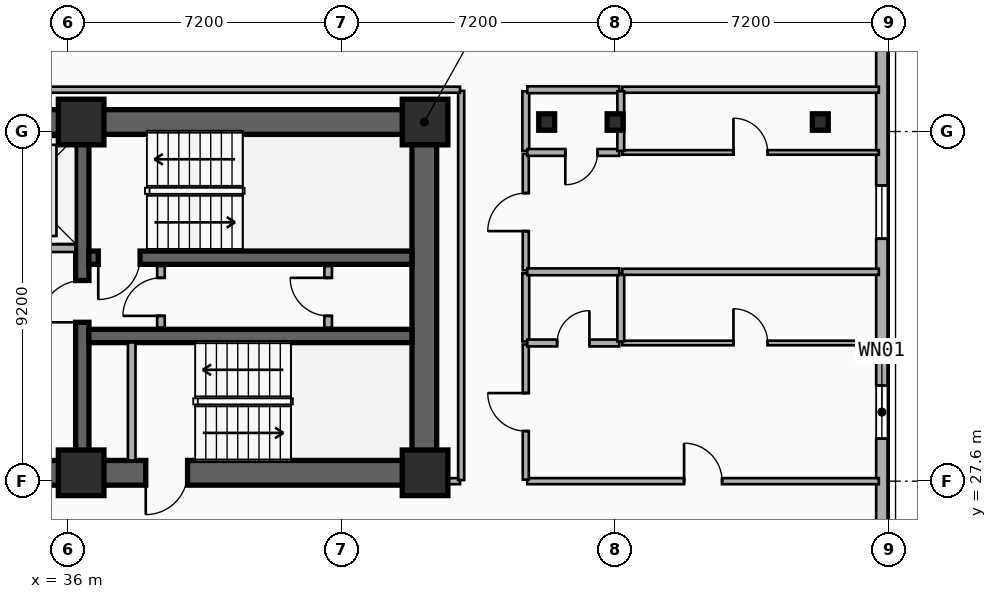
"""IFC4 building model, lengths in metres.
Left out: names, types, materials, properties, quantities, classifications, styles, units other than length and angle.
Written with IfcOpenShell. Run it as: python <this file> out.ifc"""

import sys

from ifc_helpers import new_model, si_unit, direction, frame, frame_2d, origin, origin_2d, place, context, subcontext, project, spatial, rectangle, i_section, extrude, element, fill, save


model = new_model("IFC4")
c1 = context("Model", 3, precision=1e-05, world=origin(), true_north=direction((0.0, 1.0)))
c2 = subcontext(c1, "Body", "Model", "MODEL_VIEW")
j1 = project(units=[si_unit("LENGTHUNIT", "METRE"), si_unit("PLANEANGLEUNIT", "RADIAN")], contexts=[c1])
p1 = place(None, origin())
s1 = spatial("IfcSite", under=j1, at=p1, CompositionType="ELEMENT")
p2 = place(p1, origin())
s2 = spatial("IfcBuilding", under=s1, at=p2, CompositionType="ELEMENT")
p3 = place(p2, frame((0.0, 0.0, 125.8)))
s3 = spatial("IfcBuildingStorey", under=s2, at=p3, CompositionType="ELEMENT", Elevation=125.8)
p4 = place(p3, frame((12.15, 37.05, 0.0), z_axis=(0.0, 0.0, 1.0), x_axis=(1.0, 0.0, 0.0)))
e1 = element("IfcWall", 1, at=p4, inside=s3, PredefinedType="SHEAR", context=c2, shape_type="SweptSolid", body=[
    extrude(rectangle(XDim=33.23, YDim=0.65, at=frame_2d((16.615, 0.0))), origin(), (0.0, 0.0, 1.0), 3.5),
])
p5 = place(p3, frame((45.38, 27.82, 0.0), z_axis=(0.0, 0.0, 1.0), x_axis=(-1.0, 0.0, 0.0)))
e2 = element("IfcWall", 2, at=p5, inside=s3, PredefinedType="SHEAR", context=c2, shape_type="SweptSolid", body=[
    extrude(rectangle(XDim=12.23, YDim=0.65, at=frame_2d((6.115, 0.0))), origin(), (0.0, 0.0, 1.0), 3.5),
])
p6 = place(p5, frame((9.93, 0.0, 0.0)))
e3 = element("IfcOpeningElement", 3, at=p6, cuts=e2, PredefinedType="OPENING", context=c2, shape_type="SweptSolid", body=[
    extrude(rectangle(XDim=1.1, YDim=2.15, at=frame_2d((0.55, 1.075))), frame((0.0, 0.335, 0.0), z_axis=(0.0, -1.0, 0.0), x_axis=(1.0, 0.0, 0.0)), (0.0, 0.0, 1.0), 0.67),
])
p7 = place(p5, frame((6.23, 0.0, 0.0)))
e4 = element("IfcOpeningElement", 4, at=p7, cuts=e2, PredefinedType="OPENING", context=c2, shape_type="SweptSolid", body=[
    extrude(rectangle(XDim=1.1, YDim=2.15, at=frame_2d((0.55, 1.075))), frame((0.0, 0.335, 0.0), z_axis=(0.0, -1.0, 0.0), x_axis=(1.0, 0.0, 0.0)), (0.0, 0.0, 1.0), 0.67),
])
p8 = place(p3, frame((45.38, 28.145, 0.0), z_axis=(0.0, 0.0, 1.0), x_axis=(0.0, 1.0, 0.0)))
e5 = element("IfcWall", 5, at=p8, inside=s3, PredefinedType="SHEAR", context=c2, shape_type="SweptSolid", body=[
    extrude(rectangle(XDim=8.58, YDim=0.65, at=frame_2d((4.29, 0.0))), origin(), (0.0, 0.0, 1.0), 3.5),
])
p9 = place(p3, frame((36.38, 28.145, 0.0), z_axis=(0.0, 0.0, 1.0), x_axis=(0.0, 1.0, 0.0)))
e6 = element("IfcWall", 6, at=p9, inside=s3, PredefinedType="SHEAR", context=c2, shape_type="SweptSolid", body=[
    extrude(rectangle(XDim=8.58, YDim=0.35, at=frame_2d((4.29, 0.0))), origin(), (0.0, 0.0, 1.0), 3.5),
])
p10 = place(p9, frame((3.635, 0.0, 0.0)))
e7 = element("IfcOpeningElement", 7, at=p10, cuts=e6, PredefinedType="OPENING", context=c2, shape_type="SweptSolid", body=[
    extrude(rectangle(XDim=1.1, YDim=2.15, at=frame_2d((0.55, 1.075))), frame((0.0, 0.185, 0.0), z_axis=(0.0, -1.0, 0.0), x_axis=(1.0, 0.0, 0.0)), (0.0, 0.0, 1.0), 0.37),
])
p11 = place(p3, frame((45.055, 33.48, 0.0), z_axis=(0.0, 0.0, 1.0), x_axis=(-1.0, 0.0, 0.0)))
e8 = element("IfcWall", 8, at=p11, inside=s3, PredefinedType="SHEAR", context=c2, shape_type="SweptSolid", body=[
    extrude(rectangle(XDim=8.5, YDim=0.35, at=frame_2d((4.25, 0.0))), origin(), (0.0, 0.0, 1.0), 3.5),
])
p12 = place(p11, frame((7.155, 0.0, 0.0)))
e9 = element("IfcOpeningElement", 9, at=p12, cuts=e8, PredefinedType="OPENING", context=c2, shape_type="SweptSolid", body=[
    extrude(rectangle(XDim=1.1, YDim=2.15, at=frame_2d((0.55, 1.075))), frame((0.0, 0.185, 0.0), z_axis=(0.0, -1.0, 0.0), x_axis=(1.0, 0.0, 0.0)), (0.0, 0.0, 1.0), 0.37),
])
p13 = place(p3, frame((36.555, 31.42, 0.0), z_axis=(0.0, 0.0, 1.0), x_axis=(1.0, 0.0, 0.0)))
e10 = element("IfcWall", 10, at=p13, inside=s3, PredefinedType="SHEAR", context=c2, shape_type="SweptSolid", body=[
    extrude(rectangle(XDim=8.5, YDim=0.35, at=frame_2d((4.25, 0.0))), origin(), (0.0, 0.0, 1.0), 3.5),
])
for number, where, z_axis, x_axis in (
    (11, (36.35, 27.82, 0.0), (0.0, 0.0, 1.0), (1.0, 0.0, 0.0)),
    (12, (36.35, 37.05, 0.0), (0.0, 0.0, 1.0), (1.0, 0.0, 0.0)),
    (13, (45.4, 27.82, 0.0), (0.0, 0.0, 1.0), (1.0, 0.0, 0.0)),
    (14, (45.4, 37.05, 0.0), (0.0, 0.0, 1.0), (1.0, 0.0, 0.0)),
):
    element("IfcColumn", number, at=place(p3, frame(where, z_axis=z_axis, x_axis=x_axis)), inside=s3, PredefinedType="COLUMN", context=c2, shape_type="SweptSolid", body=[
        extrude(rectangle(XDim=1.2, YDim=1.2, at=origin_2d()), origin(), (0.0, 0.0, 1.0), 3.5),
    ])
for number, where, z_axis, x_axis in (
    (15, (48.6, 37.05, 0.0), (0.0, 0.0, 1.0), (1.0, 0.0, 0.0)),
    (16, (50.4, 37.05, 0.0), (0.0, 0.0, 1.0), (1.0, 0.0, 0.0)),
    (17, (55.8, 37.05, 0.0), (0.0, 0.0, 1.0), (1.0, 0.0, 0.0)),
):
    element("IfcColumn", number, at=place(p3, frame(where, z_axis=z_axis, x_axis=x_axis)), inside=s3, PredefinedType="COLUMN", context=c2, shape_type="SweptSolid", body=[
        extrude(i_section(OverallWidth=0.418, OverallDepth=0.432, WebThickness=0.035, FlangeThickness=0.056, FilletRadius=0.015, at=origin_2d()), origin(), (0.0, 0.0, 1.0), 3.5),
    ])
p14 = place(p3, frame((57.42, 39.0, 0.0), z_axis=(0.0, 0.0, 1.0), x_axis=(0.0, -1.0, 0.0)))
e18 = element("IfcWall", 18, at=p14, inside=s3, PredefinedType="SOLIDWALL", context=c2, shape_type="SweptSolid", body=[
    extrude(rectangle(XDim=18.0, YDim=0.3, at=frame_2d((9.0, 0.0))), origin(), (0.0, 0.0, 1.0), 3.24),
])
p15 = place(p14, frame((8.882, 0.0, 0.48)))
e19 = element("IfcOpeningElement", 19, at=p15, cuts=e18, PredefinedType="OPENING", context=c2, shape_type="SweptSolid", body=[
    extrude(rectangle(XDim=1.4, YDim=1.8, at=frame_2d((0.7, 0.9))), frame((0.0, 0.16, 0.0), z_axis=(0.0, -1.0, 0.0), x_axis=(1.0, 0.0, 0.0)), (0.0, 0.0, 1.0), 0.32),
])
p16 = place(p14, frame((3.621, 0.0, 0.48)))
e20 = element("IfcOpeningElement", 20, at=p16, cuts=e18, PredefinedType="OPENING", context=c2, shape_type="SweptSolid", body=[
    extrude(rectangle(XDim=1.4, YDim=1.8, at=frame_2d((0.7, 0.9))), frame((0.0, 0.16, 0.0), z_axis=(0.0, -1.0, 0.0), x_axis=(1.0, 0.0, 0.0)), (0.0, 0.0, 1.0), 0.32),
])
p17 = place(p14, frame((14.625, 0.0, 0.48)))
e21 = element("IfcOpeningElement", 21, at=p17, cuts=e18, PredefinedType="OPENING", context=c2, shape_type="SweptSolid", body=[
    extrude(rectangle(XDim=1.4, YDim=1.8, at=frame_2d((0.7, 0.9))), frame((0.0, 0.16, 0.0), z_axis=(0.0, -1.0, 0.0), x_axis=(1.0, 0.0, 0.0)), (0.0, 0.0, 1.0), 0.32),
])
p18 = place(p3, frame((33.475, 33.73, 0.0), z_axis=(0.0, 0.0, 1.0), x_axis=(1.0, 0.0, 0.0)))
e22 = element("IfcWall", 22, at=p18, inside=s3, PredefinedType="PARTITIONING", context=c2, shape_type="SweptSolid", body=[
    extrude(rectangle(XDim=2.725, YDim=0.2, at=frame_2d((1.362, 0.0))), origin(), (0.0, 0.0, 1.0), 2.212),
])
p19 = place(p18, frame((0.812, 0.0, 0.0)))
e23 = element("IfcOpeningElement", 23, at=p19, cuts=e22, PredefinedType="OPENING", context=c2, shape_type="SweptSolid", body=[
    extrude(rectangle(XDim=1.1, YDim=2.15, at=frame_2d((0.55, 1.075))), frame((0.0, 0.11, 0.0), z_axis=(0.0, -1.0, 0.0), x_axis=(1.0, 0.0, 0.0)), (0.0, 0.0, 1.0), 0.22),
])
p20 = place(p3, frame((37.68, 28.145, 0.0), z_axis=(0.0, 0.0, 1.0), x_axis=(0.0, 1.0, 0.0)))
e24 = element("IfcWall", 24, at=p20, inside=s3, PredefinedType="PARTITIONING", context=c2, shape_type="SweptSolid", body=[
    extrude(rectangle(XDim=3.105, YDim=0.2, at=frame_2d((1.552, 0.0))), origin(), (0.0, 0.0, 1.0), 2.62),
])
p21 = place(p3, frame((38.45, 31.64, 0.0), z_axis=(0.0, 0.0, 1.0), x_axis=(0.0, 1.0, 0.0)))
e25 = element("IfcWall", 25, at=p21, inside=s3, PredefinedType="PARTITIONING", context=c2, shape_type="SweptSolid", body=[
    extrude(rectangle(XDim=1.62, YDim=0.2, at=frame_2d((0.81, 0.0))), origin(), (0.0, 0.0, 1.0), 3.24),
])
p22 = place(p21, frame((0.31, 0.0, 0.0)))
e26 = element("IfcOpeningElement", 26, at=p22, cuts=e25, PredefinedType="OPENING", context=c2, shape_type="SweptSolid", body=[
    extrude(rectangle(XDim=1.0, YDim=2.15, at=frame_2d((0.5, 1.075))), frame((0.0, 0.11, 0.0), z_axis=(0.0, -1.0, 0.0), x_axis=(1.0, 0.0, 0.0)), (0.0, 0.0, 1.0), 0.22),
])
p23 = place(p3, frame((42.85, 31.64, 0.0), z_axis=(0.0, 0.0, 1.0), x_axis=(0.0, 1.0, 0.0)))
e27 = element("IfcWall", 27, at=p23, inside=s3, PredefinedType="PARTITIONING", context=c2, shape_type="SweptSolid", body=[
    extrude(rectangle(XDim=1.62, YDim=0.2, at=frame_2d((0.81, 0.0))), origin(), (0.0, 0.0, 1.0), 3.24),
])
p24 = place(p23, frame((0.31, 0.0, 0.0)))
e28 = element("IfcOpeningElement", 28, at=p24, cuts=e27, PredefinedType="OPENING", context=c2, shape_type="SweptSolid", body=[
    extrude(rectangle(XDim=1.0, YDim=2.15, at=frame_2d((0.5, 1.075))), frame((0.0, 0.11, 0.0), z_axis=(0.0, -1.0, 0.0), x_axis=(1.0, 0.0, 0.0)), (0.0, 0.0, 1.0), 0.22),
])
p25 = place(p3, frame((48.09, 27.6, 0.0), z_axis=(0.0, 0.0, 1.0), x_axis=(1.0, 0.0, 0.0)))
e29 = element("IfcWall", 29, at=p25, inside=s3, PredefinedType="PARTITIONING", context=c2, shape_type="SweptSolid", body=[
    extrude(rectangle(XDim=9.25, YDim=0.16, at=frame_2d((4.625, 0.0))), origin(), (0.0, 0.0, 1.0), 2.57),
])
p26 = place(p25, frame((4.125, 0.0, 0.0)))
e30 = element("IfcOpeningElement", 30, at=p26, cuts=e29, PredefinedType="OPENING", context=c2, shape_type="SweptSolid", body=[
    extrude(rectangle(XDim=1.0, YDim=2.15, at=frame_2d((0.5, 1.075))), frame((0.0, 0.09, 0.0), z_axis=(0.0, -1.0, 0.0), x_axis=(1.0, 0.0, 0.0)), (0.0, 0.0, 1.0), 0.18),
])
p27 = place(p3, frame((48.05, 27.64, 0.0), z_axis=(0.0, 0.0, 1.0), x_axis=(0.0, 1.0, 0.0)))
e31 = element("IfcWall", 31, at=p27, inside=s3, PredefinedType="PARTITIONING", context=c2, shape_type="SweptSolid", body=[
    extrude(rectangle(XDim=3.556, YDim=0.16, at=frame_2d((1.778, 0.0))), origin(), (0.0, 0.0, 1.0), 3.24),
])
p28 = place(p27, frame((1.278, 0.0, 0.0)))
e32 = element("IfcOpeningElement", 32, at=p28, cuts=e31, PredefinedType="OPENING", context=c2, shape_type="SweptSolid", body=[
    extrude(rectangle(XDim=1.0, YDim=2.15, at=frame_2d((0.5, 1.075))), frame((0.0, 0.09, 0.0), z_axis=(0.0, -1.0, 0.0), x_axis=(1.0, 0.0, 0.0)), (0.0, 0.0, 1.0), 0.18),
])
p29 = place(p3, frame((48.05, 31.276, 0.0), z_axis=(0.0, 0.0, 1.0), x_axis=(0.0, 1.0, 0.0)))
e33 = element("IfcWall", 33, at=p29, inside=s3, PredefinedType="PLUMBINGWALL", context=c2, shape_type="SweptSolid", body=[
    extrude(rectangle(XDim=1.793, YDim=0.18, at=frame_2d((0.896, 0.0))), origin(), (0.0, 0.0, 1.0), 3.24),
])
p30 = place(p3, frame((48.05, 33.149, 0.0), z_axis=(0.0, 0.0, 1.0), x_axis=(0.0, 1.0, 0.0)))
e34 = element("IfcWall", 34, at=p30, inside=s3, PredefinedType="PARTITIONING", context=c2, shape_type="SweptSolid", body=[
    extrude(rectangle(XDim=3.061, YDim=0.16, at=frame_2d((1.531, 0.0))), origin(), (0.0, 0.0, 1.0), 3.24),
])
p31 = place(p30, frame((1.031, 0.0, 0.0)))
e35 = element("IfcOpeningElement", 35, at=p31, cuts=e34, PredefinedType="OPENING", context=c2, shape_type="SweptSolid", body=[
    extrude(rectangle(XDim=1.0, YDim=2.15, at=frame_2d((0.5, 1.075))), frame((0.0, 0.09, 0.0), z_axis=(0.0, -1.0, 0.0), x_axis=(1.0, 0.0, 0.0)), (0.0, 0.0, 1.0), 0.18),
])
p32 = place(p3, frame((48.05, 36.29, 0.0), z_axis=(0.0, 0.0, 1.0), x_axis=(0.0, 1.0, 0.0)))
e36 = element("IfcWall", 36, at=p32, inside=s3, PredefinedType="PLUMBINGWALL", context=c2, shape_type="SweptSolid", body=[
    extrude(rectangle(XDim=1.57, YDim=0.18, at=frame_2d((0.785, 0.0))), origin(), (0.0, 0.0, 1.0), 2.72),
])
p33 = place(p3, frame((48.09, 37.9, 0.0), z_axis=(0.0, 0.0, 1.0), x_axis=(1.0, 0.0, 0.0)))
e37 = element("IfcWall", 37, at=p33, inside=s3, PredefinedType="PLUMBINGWALL", context=c2, shape_type="SweptSolid", body=[
    extrude(rectangle(XDim=2.42, YDim=0.18, at=frame_2d((1.21, 0.0))), origin(), (0.0, 0.0, 1.0), 3.24),
])
p34 = place(p3, frame((50.59, 37.9, 0.0), z_axis=(0.0, 0.0, 1.0), x_axis=(1.0, 0.0, 0.0)))
e38 = element("IfcWall", 38, at=p34, inside=s3, PredefinedType="PARTITIONING", context=c2, shape_type="SweptSolid", body=[
    extrude(rectangle(XDim=6.75, YDim=0.16, at=frame_2d((3.375, 0.0))), origin(), (0.0, 0.0, 1.0), 3.24),
])
p35 = place(p3, frame((48.09, 31.236, 0.0), z_axis=(0.0, 0.0, 1.0), x_axis=(1.0, 0.0, 0.0)))
e39 = element("IfcWall", 39, at=p35, inside=s3, PredefinedType="PLUMBINGWALL", context=c2, shape_type="SweptSolid", body=[
    extrude(rectangle(XDim=2.42, YDim=0.18, at=frame_2d((1.21, 0.0))), origin(), (0.0, 0.0, 1.0), 2.57),
])
p36 = place(p35, frame((0.785, 0.0, 0.0)))
e40 = element("IfcOpeningElement", 40, at=p36, cuts=e39, PredefinedType="OPENING", context=c2, shape_type="SweptSolid", body=[
    extrude(rectangle(XDim=0.85, YDim=2.1, at=frame_2d((0.425, 1.05))), frame((0.0, 0.1, 0.0), z_axis=(0.0, -1.0, 0.0), x_axis=(1.0, 0.0, 0.0)), (0.0, 0.0, 1.0), 0.2),
])
p37 = place(p3, frame((50.59, 31.236, 0.0), z_axis=(0.0, 0.0, 1.0), x_axis=(1.0, 0.0, 0.0)))
e41 = element("IfcWall", 41, at=p37, inside=s3, PredefinedType="PARTITIONING", context=c2, shape_type="SweptSolid", body=[
    extrude(rectangle(XDim=6.75, YDim=0.12, at=frame_2d((3.375, 0.0))), origin(), (0.0, 0.0, 1.0), 2.57),
])
p38 = place(p37, frame((2.925, 0.0, 0.0)))
e42 = element("IfcOpeningElement", 42, at=p38, cuts=e41, PredefinedType="OPENING", context=c2, shape_type="SweptSolid", body=[
    extrude(rectangle(XDim=0.9, YDim=2.1, at=frame_2d((0.45, 1.05))), frame((0.0, 0.07, 0.0), z_axis=(0.0, -1.0, 0.0), x_axis=(1.0, 0.0, 0.0)), (0.0, 0.0, 1.0), 0.14),
])
p39 = place(p3, frame((50.55, 31.276, 0.0), z_axis=(0.0, 0.0, 1.0), x_axis=(0.0, 1.0, 0.0)))
e43 = element("IfcWall", 43, at=p39, inside=s3, PredefinedType="PLUMBINGWALL", context=c2, shape_type="SweptSolid", body=[
    extrude(rectangle(XDim=1.793, YDim=0.18, at=frame_2d((0.896, 0.0))), origin(), (0.0, 0.0, 1.0), 2.57),
])
p40 = place(p3, frame((48.09, 33.109, 0.0), z_axis=(0.0, 0.0, 1.0), x_axis=(1.0, 0.0, 0.0)))
e44 = element("IfcWall", 44, at=p40, inside=s3, PredefinedType="PLUMBINGWALL", context=c2, shape_type="SweptSolid", body=[
    extrude(rectangle(XDim=2.42, YDim=0.18, at=frame_2d((1.21, 0.0))), origin(), (0.0, 0.0, 1.0), 2.57),
])
p41 = place(p3, frame((50.59, 33.109, 0.0), z_axis=(0.0, 0.0, 1.0), x_axis=(1.0, 0.0, 0.0)))
e45 = element("IfcWall", 45, at=p41, inside=s3, PredefinedType="PARTITIONING", context=c2, shape_type="SweptSolid", body=[
    extrude(rectangle(XDim=6.75, YDim=0.16, at=frame_2d((3.375, 0.0))), origin(), (0.0, 0.0, 1.0), 2.57),
])
p42 = place(p3, frame((50.51, 36.25, 0.0), z_axis=(0.0, 0.0, 1.0), x_axis=(-1.0, 0.0, 0.0)))
e46 = element("IfcWall", 46, at=p42, inside=s3, PredefinedType="PLUMBINGWALL", context=c2, shape_type="SweptSolid", body=[
    extrude(rectangle(XDim=2.42, YDim=0.18, at=frame_2d((1.21, 0.0))), origin(), (0.0, 0.0, 1.0), 2.57),
])
p43 = place(p42, frame((0.57, 0.0, 0.0)))
e47 = element("IfcOpeningElement", 47, at=p43, cuts=e46, PredefinedType="OPENING", context=c2, shape_type="SweptSolid", body=[
    extrude(rectangle(XDim=0.85, YDim=2.1, at=frame_2d((0.425, 1.05))), frame((0.0, 0.1, 0.0), z_axis=(0.0, -1.0, 0.0), x_axis=(1.0, 0.0, 0.0)), (0.0, 0.0, 1.0), 0.2),
])
p44 = place(p3, frame((50.59, 36.25, 0.0), z_axis=(0.0, 0.0, 1.0), x_axis=(1.0, 0.0, 0.0)))
e48 = element("IfcWall", 48, at=p44, inside=s3, PredefinedType="PARTITIONING", context=c2, shape_type="SweptSolid", body=[
    extrude(rectangle(XDim=6.75, YDim=0.12, at=frame_2d((3.375, 0.0))), origin(), (0.0, 0.0, 1.0), 2.57),
])
p45 = place(p44, frame((2.925, 0.0, 0.0)))
e49 = element("IfcOpeningElement", 49, at=p45, cuts=e48, PredefinedType="OPENING", context=c2, shape_type="SweptSolid", body=[
    extrude(rectangle(XDim=0.9, YDim=2.1, at=frame_2d((0.45, 1.05))), frame((0.0, 0.07, 0.0), z_axis=(0.0, -1.0, 0.0), x_axis=(1.0, 0.0, 0.0)), (0.0, 0.0, 1.0), 0.14),
])
p46 = place(p3, frame((50.55, 36.29, 0.0), z_axis=(0.0, 0.0, 1.0), x_axis=(0.0, 1.0, 0.0)))
e50 = element("IfcWall", 50, at=p46, inside=s3, PredefinedType="PLUMBINGWALL", context=c2, shape_type="SweptSolid", body=[
    extrude(rectangle(XDim=1.57, YDim=0.18, at=frame_2d((0.785, 0.0))), origin(), (0.0, 0.0, 1.0), 2.57),
])
p47 = place(p3, frame((45.41, 27.6, 0.0), z_axis=(0.0, 0.0, 1.0), x_axis=(1.0, 0.0, 0.0)))
e51 = element("IfcWall", 51, at=p47, inside=s3, PredefinedType="PARTITIONING", context=c2, shape_type="SweptSolid", body=[
    extrude(rectangle(XDim=0.91, YDim=0.16, at=frame_2d((0.455, 0.0))), origin(), (0.0, 0.0, 1.0), 2.28),
])
p48 = place(p3, frame((46.35, 27.63, 0.0), z_axis=(0.0, 0.0, 1.0), x_axis=(0.0, 1.0, 0.0)))
e52 = element("IfcWall", 52, at=p48, inside=s3, PredefinedType="PARTITIONING", context=c2, shape_type="SweptSolid", body=[
    extrude(rectangle(XDim=10.24, YDim=0.16, at=frame_2d((5.12, 0.0))), origin(), (0.0, 0.0, 1.0), 2.72),
])
p49 = place(p3, frame((11.28, 37.9, 0.0), z_axis=(0.0, 0.0, 1.0), x_axis=(1.0, 0.0, 0.0)))
e53 = element("IfcWall", 53, at=p49, inside=s3, PredefinedType="PARTITIONING", context=c2, shape_type="SweptSolid", body=[
    extrude(rectangle(XDim=35.04, YDim=0.16, at=frame_2d((17.52, 0.0))), origin(), (0.0, 0.0, 1.0), 3.24),
])
p50 = place(p15, origin())
e54 = element("IfcWindow", 54, at=p50, inside=s3, PartitioningType="SINGLE_PANEL", PredefinedType="WINDOW", context=c2, shape_type="SweptSolid", body=[
    extrude(rectangle(XDim=1.4, YDim=1.8, at=frame_2d((0.7, 0.9))), frame((0.0, 0.03, 0.0), z_axis=(0.0, -1.0, 0.0), x_axis=(1.0, 0.0, 0.0)), (0.0, 0.0, 1.0), 0.06),
])
fill(e19, e54)
p51 = place(p16, origin())
e55 = element("IfcWindow", 55, at=p51, inside=s3, PartitioningType="SINGLE_PANEL", PredefinedType="WINDOW", context=c2, shape_type="SweptSolid", body=[
    extrude(rectangle(XDim=1.4, YDim=1.8, at=frame_2d((0.7, 0.9))), frame((0.0, 0.03, 0.0), z_axis=(0.0, -1.0, 0.0), x_axis=(1.0, 0.0, 0.0)), (0.0, 0.0, 1.0), 0.06),
])
fill(e20, e55)
p52 = place(p12, origin())
e56 = element("IfcDoor", 56, at=p52, inside=s3, OperationType="SINGLE_SWING_RIGHT", PredefinedType="DOOR", context=c2, shape_type="SweptSolid", body=[
    extrude(rectangle(XDim=1.1, YDim=2.15, at=frame_2d((0.55, 1.075))), frame((0.0, 0.025, 0.0), z_axis=(0.0, -1.0, 0.0), x_axis=(1.0, 0.0, 0.0)), (0.0, 0.0, 1.0), 0.05),
])
fill(e9, e56)
p53 = place(p10, origin())
e57 = element("IfcDoor", 57, at=p53, inside=s3, OperationType="SINGLE_SWING_LEFT", PredefinedType="DOOR", context=c2, shape_type="SweptSolid", body=[
    extrude(rectangle(XDim=1.1, YDim=2.15, at=frame_2d((0.55, 1.075))), frame((0.0, 0.025, 0.0), z_axis=(0.0, -1.0, 0.0), x_axis=(1.0, 0.0, 0.0)), (0.0, 0.0, 1.0), 0.05),
])
fill(e7, e57)
p54 = place(p7, origin())
e58 = element("IfcDoor", 58, at=p54, inside=s3, OperationType="SINGLE_SWING_RIGHT", PredefinedType="DOOR", context=c2, shape_type="SweptSolid", body=[
    extrude(rectangle(XDim=1.1, YDim=2.15, at=frame_2d((0.55, 1.075))), frame((0.0, 0.025, 0.0), z_axis=(0.0, -1.0, 0.0), x_axis=(1.0, 0.0, 0.0)), (0.0, 0.0, 1.0), 0.05),
])
fill(e4, e58)
p55 = place(p22, origin())
e59 = element("IfcDoor", 59, at=p55, inside=s3, OperationType="SINGLE_SWING_LEFT", PredefinedType="DOOR", context=c2, shape_type="SweptSolid", body=[
    extrude(rectangle(XDim=1.0, YDim=2.15, at=frame_2d((0.5, 1.075))), frame((0.0, 0.025, 0.0), z_axis=(0.0, -1.0, 0.0), x_axis=(1.0, 0.0, 0.0)), (0.0, 0.0, 1.0), 0.05),
])
fill(e26, e59)
p56 = place(p24, origin())
e60 = element("IfcDoor", 60, at=p56, inside=s3, OperationType="SINGLE_SWING_RIGHT", PredefinedType="DOOR", context=c2, shape_type="SweptSolid", body=[
    extrude(rectangle(XDim=1.0, YDim=2.15, at=frame_2d((0.5, 1.075))), frame((0.0, 0.025, 0.0), z_axis=(0.0, -1.0, 0.0), x_axis=(1.0, 0.0, 0.0)), (0.0, 0.0, 1.0), 0.05),
])
fill(e28, e60)
p57 = place(p26, origin())
e61 = element("IfcDoor", 61, at=p57, inside=s3, OperationType="SINGLE_SWING_LEFT", PredefinedType="DOOR", context=c2, shape_type="SweptSolid", body=[
    extrude(rectangle(XDim=1.0, YDim=2.15, at=frame_2d((0.5, 1.075))), frame((0.0, 0.025, 0.0), z_axis=(0.0, -1.0, 0.0), x_axis=(1.0, 0.0, 0.0)), (0.0, 0.0, 1.0), 0.05),
])
fill(e30, e61)
p58 = place(p28, origin())
e62 = element("IfcDoor", 62, at=p58, inside=s3, OperationType="SINGLE_SWING_RIGHT", PredefinedType="DOOR", context=c2, shape_type="SweptSolid", body=[
    extrude(rectangle(XDim=1.0, YDim=2.15, at=frame_2d((0.5, 1.075))), frame((0.0, 0.025, 0.0), z_axis=(0.0, -1.0, 0.0), x_axis=(1.0, 0.0, 0.0)), (0.0, 0.0, 1.0), 0.05),
])
fill(e32, e62)
p59 = place(p31, origin())
e63 = element("IfcDoor", 63, at=p59, inside=s3, OperationType="SINGLE_SWING_LEFT", PredefinedType="DOOR", context=c2, shape_type="SweptSolid", body=[
    extrude(rectangle(XDim=1.0, YDim=2.15, at=frame_2d((0.5, 1.075))), frame((0.0, 0.025, 0.0), z_axis=(0.0, -1.0, 0.0), x_axis=(1.0, 0.0, 0.0)), (0.0, 0.0, 1.0), 0.05),
])
fill(e35, e63)
p60 = place(p36, origin())
e64 = element("IfcDoor", 64, at=p60, inside=s3, OperationType="SINGLE_SWING_RIGHT", PredefinedType="DOOR", context=c2, shape_type="SweptSolid", body=[
    extrude(rectangle(XDim=0.85, YDim=2.1, at=frame_2d((0.425, 1.05))), frame((0.0, 0.025, 0.0), z_axis=(0.0, -1.0, 0.0), x_axis=(1.0, 0.0, 0.0)), (0.0, 0.0, 1.0), 0.05),
])
fill(e40, e64)
p61 = place(p38, origin())
e65 = element("IfcDoor", 65, at=p61, inside=s3, OperationType="SINGLE_SWING_LEFT", PredefinedType="DOOR", context=c2, shape_type="SweptSolid", body=[
    extrude(rectangle(XDim=0.9, YDim=2.1, at=frame_2d((0.45, 1.05))), frame((0.0, 0.025, 0.0), z_axis=(0.0, -1.0, 0.0), x_axis=(1.0, 0.0, 0.0)), (0.0, 0.0, 1.0), 0.05),
])
fill(e42, e65)
p62 = place(p43, origin())
e66 = element("IfcDoor", 66, at=p62, inside=s3, OperationType="SINGLE_SWING_RIGHT", PredefinedType="DOOR", context=c2, shape_type="SweptSolid", body=[
    extrude(rectangle(XDim=0.85, YDim=2.1, at=frame_2d((0.425, 1.05))), frame((0.0, 0.025, 0.0), z_axis=(0.0, -1.0, 0.0), x_axis=(1.0, 0.0, 0.0)), (0.0, 0.0, 1.0), 0.05),
])
fill(e47, e66)
p63 = place(p45, origin())
e67 = element("IfcDoor", 67, at=p63, inside=s3, OperationType="SINGLE_SWING_LEFT", PredefinedType="DOOR", context=c2, shape_type="SweptSolid", body=[
    extrude(rectangle(XDim=0.9, YDim=2.1, at=frame_2d((0.45, 1.05))), frame((0.0, 0.025, 0.0), z_axis=(0.0, -1.0, 0.0), x_axis=(1.0, 0.0, 0.0)), (0.0, 0.0, 1.0), 0.05),
])
fill(e49, e67)
save(model, sys.argv[1])
